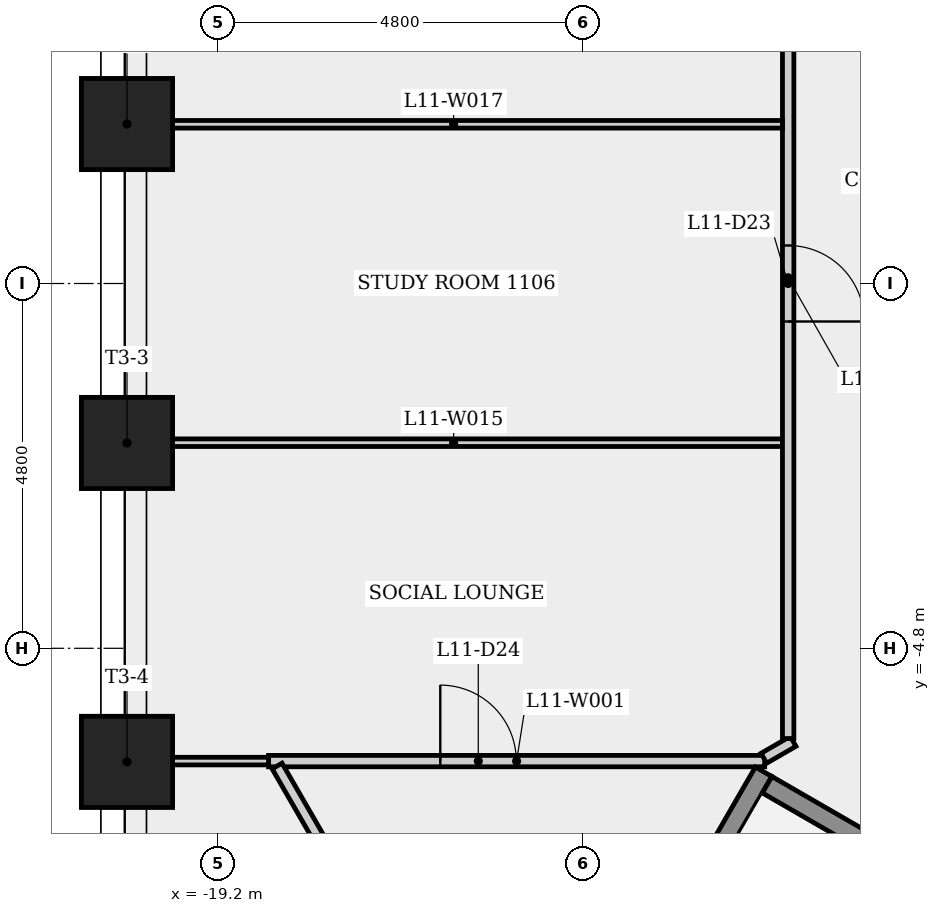
"""IFC4 building model, lengths in metres.
Left out: names, types, materials, properties, quantities, classifications, styles, units other than length and angle.
Written with IfcOpenShell. Run it as: python <this file> out.ifc"""

import sys

from ifc_helpers import new_model, si_unit, direction, frame, frame_2d, origin, origin_2d, place, context, subcontext, project, spatial, rectangle, extrude, element, fill, save


model = new_model("IFC4")
c1 = context("Model", 3, precision=1e-05, world=origin(), true_north=direction((0.0, 1.0)))
c2 = subcontext(c1, "Body", "Model", "MODEL_VIEW")
j1 = project(units=[si_unit("LENGTHUNIT", "METRE"), si_unit("PLANEANGLEUNIT", "RADIAN")], contexts=[c1])
p1 = place(None, origin())
s1 = spatial("IfcSite", under=j1, at=p1, CompositionType="ELEMENT")
p2 = place(p1, origin())
s2 = spatial("IfcBuilding", under=s1, at=p2, CompositionType="ELEMENT")
p3 = place(p2, frame((0.0, 0.0, 45.9)))
s3 = spatial("IfcBuildingStorey", under=s2, at=p3, CompositionType="ELEMENT", Elevation=45.9)
for number, where, z_axis, x_axis in (
    (1, (-20.399, 2.098, 0.0), (0.0, 0.0, 1.0), (-1.0, 0.0, 0.0)),
    (2, (-20.399, -2.098, 0.0), (0.0, 0.0, 1.0), (-1.0, 0.0, 0.0)),
    (3, (-20.399, -6.294, 0.0), (0.0, 0.0, 1.0), (-1.0, 0.0, 0.0)),
):
    element("IfcColumn", number, at=place(p3, frame(where, z_axis=z_axis, x_axis=x_axis)), inside=s3, PredefinedType="COLUMN", context=c2, shape_type="SweptSolid", body=[
        extrude(rectangle(XDim=1.2, YDim=1.2, at=origin_2d()), origin(), (0.0, 0.0, 1.0), 3.4),
    ])
p4 = place(p3, frame((-18.537, -6.284, 0.0), z_axis=(0.0, 0.0, 1.0), x_axis=(1.0, 0.0, 0.0)))
e4 = element("IfcWall", 4, at=p4, inside=s3, PredefinedType="PARTITIONING", context=c2, shape_type="SweptSolid", body=[
    extrude(rectangle(XDim=6.527, YDim=0.15, at=frame_2d((3.264, 0.0))), origin(), (0.0, 0.0, 1.0), 3.05),
])
p5 = place(p4, frame((2.26, 0.0, 0.0)))
e5 = element("IfcOpeningElement", 5, at=p5, cuts=e4, PredefinedType="OPENING", context=c2, shape_type="SweptSolid", body=[
    extrude(rectangle(XDim=1.0, YDim=2.1, at=frame_2d((0.5, 1.05))), frame((0.0, 0.085, 0.0), z_axis=(0.0, -1.0, 0.0), x_axis=(1.0, 0.0, 0.0)), (0.0, 0.0, 1.0), 0.17),
])
p6 = place(p3, frame((-18.537, -6.284, 0.0), z_axis=(0.0, 0.0, 1.0), x_axis=(-1.0, 0.0, 0.0)))
e6 = element("IfcWall", 6, at=p6, inside=s3, PredefinedType="PARTITIONING", context=c2, shape_type="SweptSolid", body=[
    extrude(rectangle(XDim=1.892, YDim=0.1, at=frame_2d((0.946, 0.0))), origin(), (0.0, 0.0, 1.0), 3.05),
])
p7 = place(p3, frame((-15.164, -11.995, 0.0), z_axis=(0.0, 0.0, 1.0), x_axis=(-0.499989336744, 0.866031560131, 0.0)))
e7 = element("IfcWall", 7, at=p7, inside=s3, PredefinedType="PARTITIONING", context=c2, shape_type="SweptSolid", body=[
    extrude(rectangle(XDim=6.52, YDim=0.15, at=frame_2d((3.26, 0.0))), origin(), (0.0, 0.0, 1.0), 3.05),
])
p8 = place(p7, frame((2.797, 0.0, 0.0)))
e8 = element("IfcOpeningElement", 8, at=p8, cuts=e7, PredefinedType="OPENING", context=c2, shape_type="SweptSolid", body=[
    extrude(rectangle(XDim=1.0, YDim=2.1, at=frame_2d((0.5, 1.05))), frame((0.0, 0.085, 0.0), z_axis=(0.0, -1.0, 0.0), x_axis=(1.0, 0.0, 0.0)), (0.0, 0.0, 1.0), 0.17),
])
p9 = place(p3, frame((-13.648, -9.239, 0.0), z_axis=(0.0, 0.0, 1.0), x_axis=(0.500017246033, 0.866015446554, 0.0)))
e9 = element("IfcWall", 9, at=p9, inside=s3, PredefinedType="SHEAR", context=c2, shape_type="SweptSolid", body=[
    extrude(rectangle(XDim=3.25, YDim=0.25, at=frame_2d((1.625, 0.0))), origin(), (0.0, 0.0, 1.0), 3.05),
])
p10 = place(p3, frame((-11.977, -6.595, 0.0), z_axis=(0.0, 0.0, 1.0), x_axis=(0.866025499775, -0.499999833739, 0.0)))
e10 = element("IfcWall", 10, at=p10, inside=s3, PredefinedType="SHEAR", context=c2, shape_type="SweptSolid", body=[
    extrude(rectangle(XDim=6.4, YDim=0.25, at=frame_2d((3.2, 0.0))), origin(), (0.0, 0.0, 1.0), 3.05),
])
p11 = place(p10, frame((5.025, 0.0, 0.0)))
e11 = element("IfcOpeningElement", 11, at=p11, cuts=e10, PredefinedType="OPENING", context=c2, shape_type="SweptSolid", body=[
    extrude(rectangle(XDim=1.0, YDim=2.1, at=frame_2d((0.5, 1.05))), frame((0.0, 0.135, 0.0), z_axis=(0.0, -1.0, 0.0), x_axis=(1.0, 0.0, 0.0)), (0.0, 0.0, 1.0), 0.27),
])
p12 = place(p3, frame((-12.02, -6.247, 0.0), z_axis=(0.0, 0.0, 1.0), x_axis=(0.866103179807, 0.499865263774, 0.0)))
e12 = element("IfcWall", 12, at=p12, inside=s3, PredefinedType="PARTITIONING", context=c2, shape_type="SweptSolid", body=[
    extrude(rectangle(XDim=0.444, YDim=0.15, at=frame_2d((0.222, 0.0))), origin(), (0.0, 0.0, 1.0), 3.05),
])
p13 = place(p3, frame((-11.775, -2.095, 0.0), z_axis=(0.0, 0.0, 1.0), x_axis=(-1.0, 0.0, 0.0)))
e13 = element("IfcWall", 13, at=p13, inside=s3, PredefinedType="PARTITIONING", context=c2, shape_type="SweptSolid", body=[
    extrude(rectangle(XDim=8.654, YDim=0.1, at=frame_2d((4.327, 0.0))), origin(), (0.0, 0.0, 1.0), 3.05),
])
p14 = place(p3, frame((-11.7, 6.137, 0.0), z_axis=(0.0, 0.0, 1.0), x_axis=(0.0, -1.0, 0.0)))
e14 = element("IfcWall", 14, at=p14, inside=s3, PredefinedType="PARTITIONING", context=c2, shape_type="SweptSolid", body=[
    extrude(rectangle(XDim=12.125, YDim=0.15, at=frame_2d((6.062, 0.0))), origin(), (0.0, 0.0, 1.0), 3.05),
])
p15 = place(p14, frame((5.637, 0.0, 0.0)))
e15 = element("IfcOpeningElement", 15, at=p15, cuts=e14, PredefinedType="OPENING", context=c2, shape_type="SweptSolid", body=[
    extrude(rectangle(XDim=1.0, YDim=2.1, at=frame_2d((0.5, 1.05))), frame((0.0, 0.085, 0.0), z_axis=(0.0, -1.0, 0.0), x_axis=(1.0, 0.0, 0.0)), (0.0, 0.0, 1.0), 0.17),
])
p16 = place(p3, frame((-11.775, 2.095, 0.0), z_axis=(0.0, 0.0, 1.0), x_axis=(-1.0, 0.0, 0.0)))
e16 = element("IfcWall", 16, at=p16, inside=s3, PredefinedType="PARTITIONING", context=c2, shape_type="SweptSolid", body=[
    extrude(rectangle(XDim=8.654, YDim=0.1, at=frame_2d((4.327, 0.0))), origin(), (0.0, 0.0, 1.0), 3.05),
])
p17 = place(p15, origin())
e17 = element("IfcDoor", 17, at=p17, inside=s3, OperationType="SINGLE_SWING_RIGHT", PredefinedType="DOOR", context=c2, shape_type="SweptSolid", body=[
    extrude(rectangle(XDim=1.0, YDim=2.1, at=frame_2d((0.5, 1.05))), frame((0.0, 0.025, 0.0), z_axis=(0.0, -1.0, 0.0), x_axis=(1.0, 0.0, 0.0)), (0.0, 0.0, 1.0), 0.05),
])
fill(e15, e17)
p18 = place(p5, origin())
e18 = element("IfcDoor", 18, at=p18, inside=s3, OperationType="SINGLE_SWING_LEFT", PredefinedType="DOOR", context=c2, shape_type="SweptSolid", body=[
    extrude(rectangle(XDim=1.0, YDim=2.1, at=frame_2d((0.5, 1.05))), frame((0.0, 0.025, 0.0), z_axis=(0.0, -1.0, 0.0), x_axis=(1.0, 0.0, 0.0)), (0.0, 0.0, 1.0), 0.05),
])
fill(e5, e18)
save(model, sys.argv[1])
